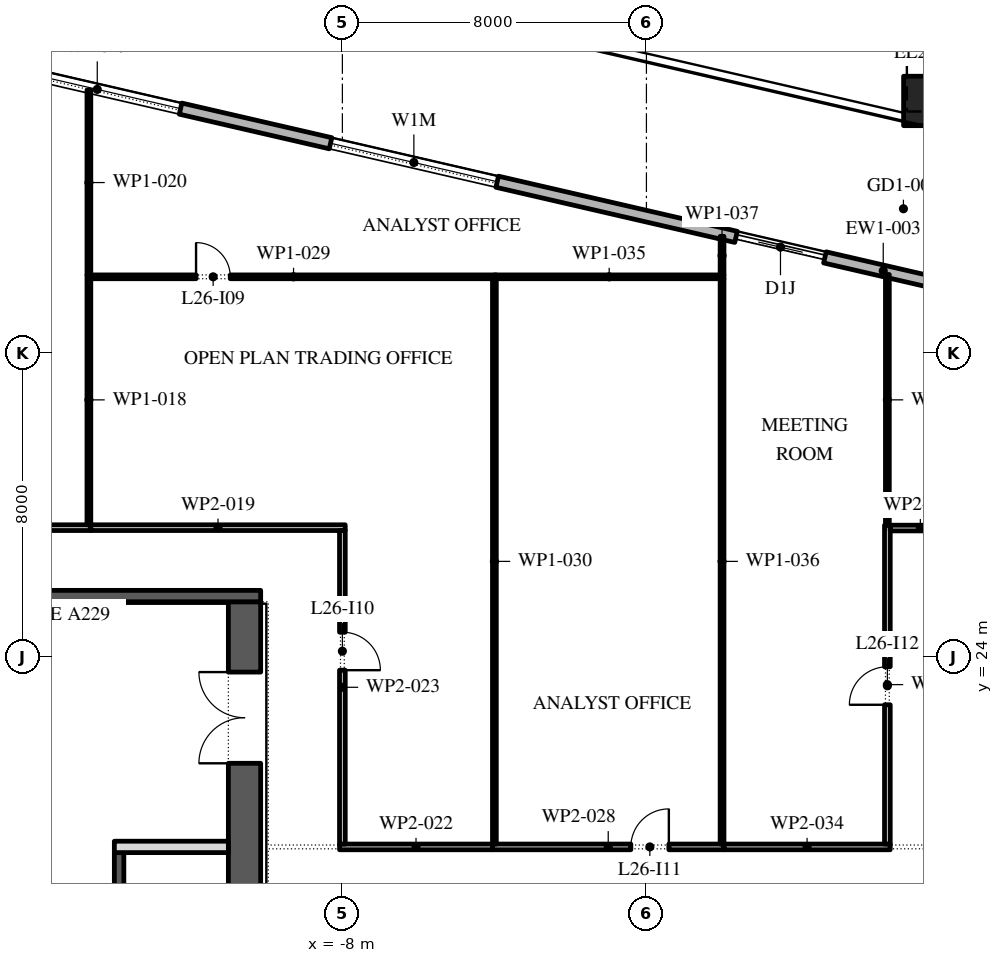
"""IFC4 building model, lengths in metres.
Left out: names, types, materials, properties, quantities, classifications, styles, units other than length and angle.
Written with IfcOpenShell. Run it as: python <this file> out.ifc"""

import sys

from ifc_helpers import new_model, si_unit, direction, frame, frame_2d, origin, origin_2d, place, context, subcontext, project, spatial, rectangle, extrude, element, fill, save


model = new_model("IFC4")
c1 = context("Model", 3, precision=1e-05, world=origin(), true_north=direction((0.0, 1.0)))
c2 = subcontext(c1, "Body", "Model", "MODEL_VIEW")
j1 = project(units=[si_unit("LENGTHUNIT", "METRE"), si_unit("PLANEANGLEUNIT", "RADIAN")], contexts=[c1])
p1 = place(None, origin())
s1 = spatial("IfcSite", under=j1, at=p1, CompositionType="ELEMENT")
p2 = place(p1, origin())
s2 = spatial("IfcBuilding", under=s1, at=p2, CompositionType="ELEMENT")
p3 = place(p2, frame((0.0, 0.0, 122.4)))
s3 = spatial("IfcBuildingStorey", under=s2, at=p3, CompositionType="ELEMENT", Elevation=122.4)
p4 = place(p3, frame((7.417, 38.628, 0.0), z_axis=(0.02037631848, 0.088220197057, 0.99589256573), x_axis=(-0.97434807649, 0.225046274885, 0.0)))
e1 = element("IfcColumn", 1, at=p4, inside=s3, PredefinedType="COLUMN", context=c2, shape_type="SweptSolid", body=[
    extrude(rectangle(XDim=1.3, YDim=1.3, at=origin_2d()), origin(), (0.0, 0.0, 1.0), 4.218),
])
p5 = place(p3, frame((31.078, 28.421, 0.0), z_axis=(0.0, 0.0, 1.0), x_axis=(-0.974370456532, 0.224949357493, 0.0)))
e2 = element("IfcWall", 2, at=p5, inside=s3, PredefinedType="STANDARD", context=c2, shape_type="SweptSolid", body=[
    extrude(rectangle(XDim=51.0, YDim=0.3, at=frame_2d((25.5, 0.0))), origin(), (0.0, 0.0, 1.0), 4.0),
])
p6 = place(p5, frame((1.875, 0.0, 0.45)))
e3 = element("IfcOpeningElement", 3, at=p6, cuts=e2, PredefinedType="OPENING", context=c2, shape_type="SweptSolid", body=[
    extrude(rectangle(XDim=4.5, YDim=2.95, at=frame_2d((2.25, 1.475))), frame((0.0, 0.16, 0.0), z_axis=(0.0, -1.0, 0.0), x_axis=(1.0, 0.0, 0.0)), (0.0, 0.0, 1.0), 0.32),
])
p7 = place(p5, frame((10.275, 0.0, 0.45)))
e4 = element("IfcOpeningElement", 4, at=p7, cuts=e2, PredefinedType="OPENING", context=c2, shape_type="SweptSolid", body=[
    extrude(rectangle(XDim=4.5, YDim=2.875, at=frame_2d((2.25, 1.438))), frame((0.0, 0.16, 0.0), z_axis=(0.0, -1.0, 0.0), x_axis=(1.0, 0.0, 0.0)), (0.0, 0.0, 1.0), 0.32),
])
p8 = place(p5, frame((18.825, 0.0, 0.45)))
e5 = element("IfcOpeningElement", 5, at=p8, cuts=e2, PredefinedType="OPENING", context=c2, shape_type="SweptSolid", body=[
    extrude(rectangle(XDim=4.5, YDim=2.825, at=frame_2d((2.25, 1.413))), frame((0.0, 0.16, 0.0), z_axis=(0.0, -1.0, 0.0), x_axis=(1.0, 0.0, 0.0)), (0.0, 0.0, 1.0), 0.32),
])
p9 = place(p5, frame((27.075, 0.0, 0.0)))
e6 = element("IfcOpeningElement", 6, at=p9, cuts=e2, PredefinedType="OPENING", context=c2, shape_type="SweptSolid", body=[
    extrude(rectangle(XDim=2.4, YDim=3.125, at=frame_2d((1.2, 1.562))), frame((0.0, 0.16, 0.0), z_axis=(0.0, -1.0, 0.0), x_axis=(1.0, 0.0, 0.0)), (0.0, 0.0, 1.0), 0.32),
])
p10 = place(p5, frame((35.925, 0.0, 0.45)))
e7 = element("IfcOpeningElement", 7, at=p10, cuts=e2, PredefinedType="OPENING", context=c2, shape_type="SweptSolid", body=[
    extrude(rectangle(XDim=4.5, YDim=2.575, at=frame_2d((2.25, 1.288))), frame((0.0, 0.16, 0.0), z_axis=(0.0, -1.0, 0.0), x_axis=(1.0, 0.0, 0.0)), (0.0, 0.0, 1.0), 0.32),
])
p11 = place(p5, frame((44.475, 0.0, 0.45)))
e8 = element("IfcOpeningElement", 8, at=p11, cuts=e2, PredefinedType="OPENING", context=c2, shape_type="SweptSolid", body=[
    extrude(rectangle(XDim=4.5, YDim=3.05, at=frame_2d((2.25, 1.525))), frame((0.0, 0.16, 0.0), z_axis=(0.0, -1.0, 0.0), x_axis=(1.0, 0.0, 0.0)), (0.0, 0.0, 1.0), 0.32),
])
p12 = place(p3, frame((-10.575, -2.45, 0.0), z_axis=(0.0, 0.0, 1.0), x_axis=(0.0, 1.0, 0.0)))
e9 = element("IfcWall", 9, at=p12, inside=s3, PredefinedType="SHEAR", context=c2, shape_type="SweptSolid", body=[
    extrude(rectangle(XDim=27.9, YDim=0.85, at=frame_2d((13.95, 0.0))), origin(), (0.0, 0.0, 1.0), 4.0),
])
p13 = place(p12, frame((23.65, 0.0, 0.0)))
e10 = element("IfcOpeningElement", 10, at=p13, cuts=e9, PredefinedType="OPENING", context=c2, shape_type="SweptSolid", body=[
    extrude(rectangle(XDim=2.4, YDim=2.1, at=frame_2d((1.2, 1.05))), frame((0.0, 0.435, 0.0), z_axis=(0.0, -1.0, 0.0), x_axis=(1.0, 0.0, 0.0)), (0.0, 0.0, 1.0), 0.87),
])
p14 = place(p12, frame((1.087, 0.0, 0.0)))
e11 = element("IfcOpeningElement", 11, at=p14, cuts=e9, PredefinedType="OPENING", context=c2, shape_type="SweptSolid", body=[
    extrude(rectangle(XDim=0.9, YDim=2.1, at=frame_2d((0.45, 1.05))), frame((0.0, 0.435, 0.0), z_axis=(0.0, -1.0, 0.0), x_axis=(1.0, 0.0, 0.0)), (0.0, 0.0, 1.0), 0.87),
])
p15 = place(p12, frame((4.262, 0.0, 0.0)))
e12 = element("IfcOpeningElement", 12, at=p15, cuts=e9, PredefinedType="OPENING", context=c2, shape_type="SweptSolid", body=[
    extrude(rectangle(XDim=1.0, YDim=2.1, at=frame_2d((0.5, 1.05))), frame((0.0, 0.435, 0.0), z_axis=(0.0, -1.0, 0.0), x_axis=(1.0, 0.0, 0.0)), (0.0, 0.0, 1.0), 0.87),
])
p16 = place(p3, frame((-21.85, 25.6, 0.0), z_axis=(0.0, 0.0, 1.0), x_axis=(1.0, 0.0, 0.0)))
e13 = element("IfcWall", 13, at=p16, inside=s3, PredefinedType="SHEAR", context=c2, shape_type="SweptSolid", body=[
    extrude(rectangle(XDim=11.7, YDim=0.3, at=frame_2d((5.85, 0.0))), origin(), (0.0, 0.0, 1.0), 4.0),
])
p17 = place(p3, frame((-13.875, -2.45, 0.0), z_axis=(0.0, 0.0, 1.0), x_axis=(0.0, 1.0, 0.0)))
e14 = element("IfcWall", 14, at=p17, inside=s3, PredefinedType="SHEAR", context=c2, shape_type="SweptSolid", body=[
    extrude(rectangle(XDim=21.3, YDim=0.25, at=frame_2d((10.65, 0.0))), origin(), (0.0, 0.0, 1.0), 4.0),
])
p18 = place(p17, frame((14.571, 0.0, 0.0)))
e15 = element("IfcOpeningElement", 15, at=p18, cuts=e14, PredefinedType="OPENING", context=c2, shape_type="SweptSolid", body=[
    extrude(rectangle(XDim=0.9, YDim=2.1, at=frame_2d((0.45, 1.05))), frame((0.0, 0.135, 0.0), z_axis=(0.0, -1.0, 0.0), x_axis=(1.0, 0.0, 0.0)), (0.0, 0.0, 1.0), 0.27),
])
p19 = place(p17, frame((6.971, 0.0, 0.0)))
e16 = element("IfcOpeningElement", 16, at=p19, cuts=e14, PredefinedType="OPENING", context=c2, shape_type="SweptSolid", body=[
    extrude(rectangle(XDim=1.1, YDim=2.1, at=frame_2d((0.55, 1.05))), frame((0.0, 0.135, 0.0), z_axis=(0.0, -1.0, 0.0), x_axis=(1.0, 0.0, 0.0)), (0.0, 0.0, 1.0), 0.27),
])
p20 = place(p3, frame((-14.0, 19.0, 0.0), z_axis=(0.0, 0.0, 1.0), x_axis=(1.0, 0.0, 0.0)))
e17 = element("IfcWall", 17, at=p20, inside=s3, PredefinedType="PARTITIONING", context=c2, shape_type="SweptSolid", body=[
    extrude(rectangle(XDim=3.0, YDim=0.3, at=frame_2d((1.5, 0.0))), origin(), (0.0, 0.0, 1.0), 4.0),
])
p21 = place(p3, frame((-23.915, 27.4, 0.0), z_axis=(0.0, 0.0, 1.0), x_axis=(1.0, 0.0, 0.0)))
e18 = element("IfcWall", 18, at=p21, inside=s3, PredefinedType="PARTITIONING", context=c2, shape_type="SweptSolid", body=[
    extrude(rectangle(XDim=9.295, YDim=0.15, at=frame_2d((4.647, 0.0))), origin(), (0.0, 0.0, 1.0), 4.0),
])
p22 = place(p21, frame((3.095, 0.0, 0.0)))
e19 = element("IfcOpeningElement", 19, at=p22, cuts=e18, PredefinedType="OPENING", context=c2, shape_type="SweptSolid", body=[
    extrude(rectangle(XDim=1.0, YDim=2.1, at=frame_2d((0.5, 1.05))), frame((0.0, 0.085, 0.0), z_axis=(0.0, -1.0, 0.0), x_axis=(1.0, 0.0, 0.0)), (0.0, 0.0, 1.0), 0.17),
])
p23 = place(p3, frame((-14.67, 27.475, 0.0), z_axis=(0.0, 0.0, 1.0), x_axis=(0.0, 1.0, 0.0)))
e20 = element("IfcWall", 20, at=p23, inside=s3, PredefinedType="PARTITIONING", context=c2, shape_type="SweptSolid", body=[
    extrude(rectangle(XDim=6.575, YDim=0.1, at=frame_2d((3.288, 0.0))), origin(), (0.0, 0.0, 1.0), 4.0),
])
p24 = place(p3, frame((-14.62, 27.4, 0.0), z_axis=(0.0, 0.0, 1.0), x_axis=(1.0, 0.0, 0.0)))
e21 = element("IfcWall", 21, at=p24, inside=s3, PredefinedType="PARTITIONING", context=c2, shape_type="SweptSolid", body=[
    extrude(rectangle(XDim=6.695, YDim=0.15, at=frame_2d((3.348, 0.0))), origin(), (0.0, 0.0, 1.0), 4.0),
])
p25 = place(p3, frame((-14.67, 34.05, 0.0), z_axis=(0.0, 0.0, 1.0), x_axis=(0.0, 1.0, 0.0)))
e22 = element("IfcWall", 22, at=p25, inside=s3, PredefinedType="PARTITIONING", context=c2, shape_type="SweptSolid", body=[
    extrude(rectangle(XDim=4.861, YDim=0.1, at=frame_2d((2.43, 0.0))), origin(), (0.0, 0.0, 1.0), 4.0),
])
p26 = place(p3, frame((-8.075, 19.0, 0.0), z_axis=(0.0, 0.0, 1.0), x_axis=(1.0, 0.0, 0.0)))
e23 = element("IfcWall", 23, at=p26, inside=s3, PredefinedType="PARTITIONING", context=c2, shape_type="SweptSolid", body=[
    extrude(rectangle(XDim=4.025, YDim=0.15, at=frame_2d((2.012, 0.0))), origin(), (0.0, 0.0, 1.0), 4.0),
])
p27 = place(p3, frame((-8.0, 27.325, 0.0), z_axis=(0.0, 0.0, 1.0), x_axis=(0.0, -1.0, 0.0)))
e24 = element("IfcWall", 24, at=p27, inside=s3, PredefinedType="PARTITIONING", context=c2, shape_type="SweptSolid", body=[
    extrude(rectangle(XDim=8.25, YDim=0.15, at=frame_2d((4.125, 0.0))), origin(), (0.0, 0.0, 1.0), 4.0),
])
p28 = place(p27, frame((2.675, 0.0, 0.0)))
e25 = element("IfcOpeningElement", 25, at=p28, cuts=e24, PredefinedType="OPENING", context=c2, shape_type="SweptSolid", body=[
    extrude(rectangle(XDim=1.0, YDim=2.1, at=frame_2d((0.5, 1.05))), frame((0.0, 0.085, 0.0), z_axis=(0.0, -1.0, 0.0), x_axis=(1.0, 0.0, 0.0)), (0.0, 0.0, 1.0), 0.17),
])
p29 = place(p3, frame((-4.05, 19.0, 0.0), z_axis=(0.0, 0.0, 1.0), x_axis=(1.0, 0.0, 0.0)))
e26 = element("IfcWall", 26, at=p29, inside=s3, PredefinedType="PARTITIONING", context=c2, shape_type="SweptSolid", body=[
    extrude(rectangle(XDim=6.09, YDim=0.15, at=frame_2d((3.045, 0.0))), origin(), (0.0, 0.0, 1.0), 4.0),
])
p30 = place(p29, frame((3.64, 0.0, 0.0)))
e27 = element("IfcOpeningElement", 27, at=p30, cuts=e26, PredefinedType="OPENING", context=c2, shape_type="SweptSolid", body=[
    extrude(rectangle(XDim=1.0, YDim=2.1, at=frame_2d((0.5, 1.05))), frame((0.0, 0.085, 0.0), z_axis=(0.0, -1.0, 0.0), x_axis=(1.0, 0.0, 0.0)), (0.0, 0.0, 1.0), 0.17),
])
p31 = place(p3, frame((-3.95, 34.0, 0.0), z_axis=(0.0, 0.0, 1.0), x_axis=(-1.0, 0.0, 0.0)))
e28 = element("IfcWall", 28, at=p31, inside=s3, PredefinedType="PARTITIONING", context=c2, shape_type="SweptSolid", body=[
    extrude(rectangle(XDim=10.67, YDim=0.1, at=frame_2d((5.335, 0.0))), origin(), (0.0, 0.0, 1.0), 4.0),
])
p32 = place(p31, frame((7.0, 0.0, 0.0)))
e29 = element("IfcOpeningElement", 29, at=p32, cuts=e28, PredefinedType="OPENING", context=c2, shape_type="SweptSolid", body=[
    extrude(rectangle(XDim=0.9, YDim=2.1, at=frame_2d((0.45, 1.05))), frame((0.0, 0.06, 0.0), z_axis=(0.0, -1.0, 0.0), x_axis=(1.0, 0.0, 0.0)), (0.0, 0.0, 1.0), 0.12),
])
p33 = place(p3, frame((-4.0, 33.95, 0.0), z_axis=(0.0, 0.0, 1.0), x_axis=(0.0, -1.0, 0.0)))
e30 = element("IfcWall", 30, at=p33, inside=s3, PredefinedType="PARTITIONING", context=c2, shape_type="SweptSolid", body=[
    extrude(rectangle(XDim=14.875, YDim=0.1, at=frame_2d((7.438, 0.0))), origin(), (0.0, 0.0, 1.0), 4.0),
])
p34 = place(p3, frame((2.04, 19.0, 0.0), z_axis=(0.0, 0.0, 1.0), x_axis=(1.0, 0.0, 0.0)))
e31 = element("IfcWall", 31, at=p34, inside=s3, PredefinedType="PARTITIONING", context=c2, shape_type="SweptSolid", body=[
    extrude(rectangle(XDim=4.375, YDim=0.15, at=frame_2d((2.188, 0.0))), origin(), (0.0, 0.0, 1.0), 4.0),
])
p35 = place(p3, frame((2.04, 34.0, 0.0), z_axis=(0.0, 0.0, 1.0), x_axis=(-1.0, 0.0, 0.0)))
e32 = element("IfcWall", 32, at=p35, inside=s3, PredefinedType="PARTITIONING", context=c2, shape_type="SweptSolid", body=[
    extrude(rectangle(XDim=6.04, YDim=0.1, at=frame_2d((3.02, 0.0))), origin(), (0.0, 0.0, 1.0), 4.0),
])
p36 = place(p3, frame((1.99, 33.95, 0.0), z_axis=(0.0, 0.0, 1.0), x_axis=(0.0, -1.0, 0.0)))
e33 = element("IfcWall", 33, at=p36, inside=s3, PredefinedType="PARTITIONING", context=c2, shape_type="SweptSolid", body=[
    extrude(rectangle(XDim=14.875, YDim=0.1, at=frame_2d((7.438, 0.0))), origin(), (0.0, 0.0, 1.0), 4.0),
])
p37 = place(p3, frame((1.99, 35.065, 0.0), z_axis=(0.0, 0.0, 1.0), x_axis=(0.0, -1.0, 0.0)))
e34 = element("IfcWall", 34, at=p37, inside=s3, PredefinedType="PARTITIONING", context=c2, shape_type="SweptSolid", body=[
    extrude(rectangle(XDim=1.015, YDim=0.1, at=frame_2d((0.507, 0.0))), origin(), (0.0, 0.0, 1.0), 4.0),
])
p38 = place(p3, frame((6.34, 19.075, 0.0), z_axis=(0.0, 0.0, 1.0), x_axis=(0.0, 1.0, 0.0)))
e35 = element("IfcWall", 35, at=p38, inside=s3, PredefinedType="PARTITIONING", context=c2, shape_type="SweptSolid", body=[
    extrude(rectangle(XDim=8.39, YDim=0.15, at=frame_2d((4.195, 0.0))), origin(), (0.0, 0.0, 1.0), 4.0),
])
p39 = place(p38, frame((3.665, 0.0, 0.0)))
e36 = element("IfcOpeningElement", 36, at=p39, cuts=e35, PredefinedType="OPENING", context=c2, shape_type="SweptSolid", body=[
    extrude(rectangle(XDim=1.0, YDim=2.1, at=frame_2d((0.5, 1.05))), frame((0.0, 0.085, 0.0), z_axis=(0.0, -1.0, 0.0), x_axis=(1.0, 0.0, 0.0)), (0.0, 0.0, 1.0), 0.17),
])
p40 = place(p3, frame((6.415, 27.39, 0.0), z_axis=(0.0, 0.0, 1.0), x_axis=(1.0, 0.0, 0.0)))
e37 = element("IfcWall", 37, at=p40, inside=s3, PredefinedType="PARTITIONING", context=c2, shape_type="SweptSolid", body=[
    extrude(rectangle(XDim=1.585, YDim=0.15, at=frame_2d((0.792, 0.0))), origin(), (0.0, 0.0, 1.0), 4.0),
])
p41 = place(p3, frame((6.34, 34.061, 0.0), z_axis=(0.0, 0.0, 1.0), x_axis=(0.0, -1.0, 0.0)))
e38 = element("IfcWall", 38, at=p41, inside=s3, PredefinedType="PARTITIONING", context=c2, shape_type="SweptSolid", body=[
    extrude(rectangle(XDim=6.596, YDim=0.1, at=frame_2d((3.298, 0.0))), origin(), (0.0, 0.0, 1.0), 4.0),
])
p42 = place(p9, origin())
e39 = element("IfcDoor", 39, at=p42, inside=s3, OperationType="DOUBLE_DOOR_SLIDING", PredefinedType="DOOR", context=c2, shape_type="SweptSolid", body=[
    extrude(rectangle(XDim=2.4, YDim=3.125, at=frame_2d((1.2, 1.562))), frame((0.0, 0.025, 0.0), z_axis=(0.0, -1.0, 0.0), x_axis=(1.0, 0.0, 0.0)), (0.0, 0.0, 1.0), 0.05),
])
fill(e6, e39)
p43 = place(p10, origin())
e40 = element("IfcWindow", 40, at=p43, inside=s3, PartitioningType="DOUBLE_PANEL_VERTICAL", PredefinedType="WINDOW", context=c2, shape_type="SweptSolid", body=[
    extrude(rectangle(XDim=4.5, YDim=2.575, at=frame_2d((2.25, 1.288))), frame((0.0, 0.03, 0.0), z_axis=(0.0, -1.0, 0.0), x_axis=(1.0, 0.0, 0.0)), (0.0, 0.0, 1.0), 0.06),
])
fill(e7, e40)
p44 = place(p11, origin())
e41 = element("IfcWindow", 41, at=p44, inside=s3, PartitioningType="DOUBLE_PANEL_VERTICAL", PredefinedType="WINDOW", context=c2, shape_type="SweptSolid", body=[
    extrude(rectangle(XDim=4.5, YDim=3.05, at=frame_2d((2.25, 1.525))), frame((0.0, 0.03, 0.0), z_axis=(0.0, -1.0, 0.0), x_axis=(1.0, 0.0, 0.0)), (0.0, 0.0, 1.0), 0.06),
])
fill(e8, e41)
p45 = place(p13, origin())
e42 = element("IfcDoor", 42, at=p45, inside=s3, OperationType="DOUBLE_DOOR_SINGLE_SWING", PredefinedType="DOOR", context=c2, shape_type="SweptSolid", body=[
    extrude(rectangle(XDim=2.4, YDim=2.1, at=frame_2d((1.2, 1.05))), frame((0.0, 0.025, 0.0), z_axis=(0.0, -1.0, 0.0), x_axis=(1.0, 0.0, 0.0)), (0.0, 0.0, 1.0), 0.05),
])
fill(e10, e42)
p46 = place(p32, frame((0.9, 0.0, 0.0), z_axis=(0.0, 0.0, 1.0), x_axis=(-1.0, 0.0, 0.0)))
e43 = element("IfcDoor", 43, at=p46, inside=s3, OperationType="SINGLE_SWING_RIGHT", PredefinedType="DOOR", context=c2, shape_type="SweptSolid", body=[
    extrude(rectangle(XDim=0.9, YDim=2.1, at=frame_2d((0.45, 1.05))), frame((0.0, 0.025, 0.0), z_axis=(0.0, -1.0, 0.0), x_axis=(1.0, 0.0, 0.0)), (0.0, 0.0, 1.0), 0.05),
])
fill(e29, e43)
p47 = place(p28, origin())
e44 = element("IfcDoor", 44, at=p47, inside=s3, OperationType="SINGLE_SWING_LEFT", PredefinedType="DOOR", context=c2, shape_type="SweptSolid", body=[
    extrude(rectangle(XDim=1.0, YDim=2.1, at=frame_2d((0.5, 1.05))), frame((0.0, 0.025, 0.0), z_axis=(0.0, -1.0, 0.0), x_axis=(1.0, 0.0, 0.0)), (0.0, 0.0, 1.0), 0.05),
])
fill(e25, e44)
p48 = place(p30, origin())
e45 = element("IfcDoor", 45, at=p48, inside=s3, OperationType="SINGLE_SWING_LEFT", PredefinedType="DOOR", context=c2, shape_type="SweptSolid", body=[
    extrude(rectangle(XDim=1.0, YDim=2.1, at=frame_2d((0.5, 1.05))), frame((0.0, 0.025, 0.0), z_axis=(0.0, -1.0, 0.0), x_axis=(1.0, 0.0, 0.0)), (0.0, 0.0, 1.0), 0.05),
])
fill(e27, e45)
p49 = place(p39, origin())
e46 = element("IfcDoor", 46, at=p49, inside=s3, OperationType="SINGLE_SWING_RIGHT", PredefinedType="DOOR", context=c2, shape_type="SweptSolid", body=[
    extrude(rectangle(XDim=1.0, YDim=2.1, at=frame_2d((0.5, 1.05))), frame((0.0, 0.025, 0.0), z_axis=(0.0, -1.0, 0.0), x_axis=(1.0, 0.0, 0.0)), (0.0, 0.0, 1.0), 0.05),
])
fill(e36, e46)
save(model, sys.argv[1])
